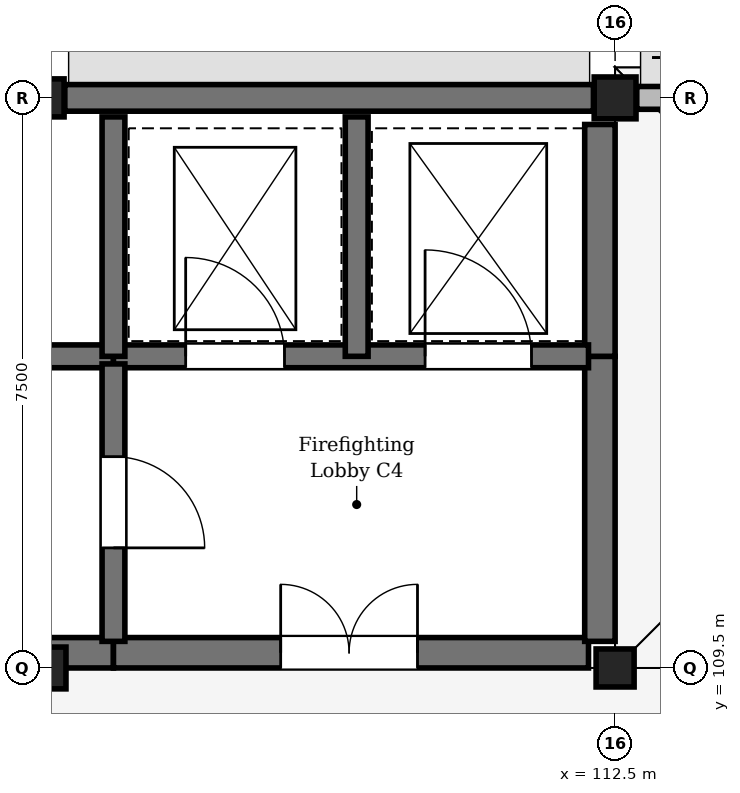
"""IFC4 building model, lengths in metres.
Left out: names, types, materials, properties, quantities, classifications, styles, units other than length and angle.
Written with IfcOpenShell. Run it as: python <this file> out.ifc"""

import sys

from ifc_helpers import new_model, si_unit, direction, frame, frame_2d, origin, origin_2d, place, context, subcontext, project, spatial, rectangle, extrude, element, fill, save


model = new_model("IFC4")
c1 = context("Model", 3, precision=1e-05, world=origin(), true_north=direction((0.0, 1.0)))
c2 = subcontext(c1, "Body", "Model", "MODEL_VIEW")
j1 = project(units=[si_unit("LENGTHUNIT", "METRE"), si_unit("PLANEANGLEUNIT", "RADIAN")], contexts=[c1])
p1 = place(None, origin())
s1 = spatial("IfcSite", under=j1, at=p1, CompositionType="ELEMENT")
p2 = place(p1, origin())
s2 = spatial("IfcBuilding", under=s1, at=p2, CompositionType="ELEMENT")
p3 = place(p2, frame((0.0, 0.0, 17.85)))
s3 = spatial("IfcBuildingStorey", under=s2, at=p3, CompositionType="ELEMENT", Elevation=17.85)
p4 = place(p3, frame((105.0, 109.5, 0.0), z_axis=(0.0, 0.0, 1.0), x_axis=(1.0, 0.0, 0.0)))
e1 = element("IfcColumn", 1, at=p4, inside=s3, PredefinedType="COLUMN", context=c2, shape_type="SweptSolid", body=[
    extrude(rectangle(XDim=0.55, YDim=0.55, at=origin_2d()), origin(), (0.0, 0.0, 1.0), 4.05),
])
for number, where, z_axis, x_axis in (
    (2, (105.0, 117.0, 0.0), (0.0, 0.0, 1.0), (1.0, 0.0, 0.0)),
    (3, (112.5, 109.5, 0.0), (0.0, 0.0, 1.0), (1.0, 0.0, 0.0)),
):
    element("IfcColumn", number, at=place(p3, frame(where, z_axis=z_axis, x_axis=x_axis)), inside=s3, PredefinedType="COLUMN", context=c2, shape_type="SweptSolid", body=[
        extrude(rectangle(XDim=0.5, YDim=0.5, at=origin_2d()), origin(), (0.0, 0.0, 1.0), 4.05),
    ])
p5 = place(p3, frame((112.5, 117.0, 0.0), z_axis=(0.0, 0.0, 1.0), x_axis=(1.0, 0.0, 0.0)))
e4 = element("IfcColumn", 4, at=p5, inside=s3, PredefinedType="COLUMN", context=c2, shape_type="SweptSolid", body=[
    extrude(rectangle(XDim=0.55, YDim=0.55, at=origin_2d()), origin(), (0.0, 0.0, 1.0), 4.05),
])
p6 = place(p3, frame((105.26, 117.0, 0.0), z_axis=(0.0, 0.0, 1.0), x_axis=(1.0, 0.0, 0.0)))
e5 = element("IfcWall", 5, at=p6, inside=s3, PredefinedType="SHEAR", context=c2, shape_type="SweptSolid", body=[
    extrude(rectangle(XDim=6.955, YDim=0.35, at=frame_2d((3.478, 0.0))), origin(), (0.0, 0.0, 1.0), 3.77),
])
p7 = place(p3, frame((112.785, 117.0, 0.0), z_axis=(0.0, 0.0, 1.0), x_axis=(1.0, 0.0, 0.0)))
e6 = element("IfcWall", 6, at=p7, inside=s3, PredefinedType="STANDARD", context=c2, shape_type="SweptSolid", body=[
    extrude(rectangle(XDim=6.98, YDim=0.3, at=frame_2d((3.49, 0.0))), origin(), (0.0, 0.0, 1.0), 3.77),
])
p8 = place(p7, frame((2.59, 0.0, 0.9)))
e7 = element("IfcOpeningElement", 7, at=p8, cuts=e6, PredefinedType="OPENING", context=c2, shape_type="SweptSolid", body=[
    extrude(rectangle(XDim=1.8, YDim=1.95, at=frame_2d((0.9, 0.975))), frame((0.0, 0.16, 0.0), z_axis=(0.0, -1.0, 0.0), x_axis=(1.0, 0.0, 0.0)), (0.0, 0.0, 1.0), 0.32),
])
p9 = place(p3, frame((97.85, 109.7, 0.0), z_axis=(0.0, 0.0, 1.0), x_axis=(1.0, 0.0, 0.0)))
e8 = element("IfcWall", 8, at=p9, inside=s3, PredefinedType="SHEAR", context=c2, shape_type="SweptSolid", body=[
    extrude(rectangle(XDim=8.05, YDim=0.4, at=frame_2d((4.025, 0.0))), origin(), (0.0, 0.0, 1.0), 3.77),
])
p10 = place(p3, frame((105.9, 109.7, 0.0), z_axis=(0.0, 0.0, 1.0), x_axis=(1.0, 0.0, 0.0)))
e9 = element("IfcWall", 9, at=p10, inside=s3, PredefinedType="SHEAR", context=c2, shape_type="SweptSolid", body=[
    extrude(rectangle(XDim=6.25, YDim=0.4, at=frame_2d((3.125, 0.0))), origin(), (0.0, 0.0, 1.0), 3.77),
])
p11 = place(p10, frame((2.2, 0.0, 0.0)))
e10 = element("IfcOpeningElement", 10, at=p11, cuts=e9, PredefinedType="OPENING", context=c2, shape_type="SweptSolid", body=[
    extrude(rectangle(XDim=1.8, YDim=2.25, at=frame_2d((0.9, 1.125))), frame((0.0, 0.21, 0.0), z_axis=(0.0, -1.0, 0.0), x_axis=(1.0, 0.0, 0.0)), (0.0, 0.0, 1.0), 0.42),
])
p12 = place(p3, frame((112.3, 109.85, 0.0), z_axis=(0.0, 0.0, 1.0), x_axis=(0.0, 1.0, 0.0)))
e11 = element("IfcWall", 11, at=p12, inside=s3, PredefinedType="SHEAR", context=c2, shape_type="SweptSolid", body=[
    extrude(rectangle(XDim=3.75, YDim=0.4, at=frame_2d((1.875, 0.0))), origin(), (0.0, 0.0, 1.0), 3.77),
])
p13 = place(p3, frame((112.3, 113.6, 0.0), z_axis=(0.0, 0.0, 1.0), x_axis=(0.0, 1.0, 0.0)))
e12 = element("IfcWall", 12, at=p13, inside=s3, PredefinedType="SHEAR", context=c2, shape_type="SweptSolid", body=[
    extrude(rectangle(XDim=3.05, YDim=0.4, at=frame_2d((1.525, 0.0))), origin(), (0.0, 0.0, 1.0), 3.77),
])
p14 = place(p3, frame((97.85, 113.6, 0.0), z_axis=(0.0, 0.0, 1.0), x_axis=(1.0, 0.0, 0.0)))
e13 = element("IfcWall", 13, at=p14, inside=s3, PredefinedType="SHEAR", context=c2, shape_type="SweptSolid", body=[
    extrude(rectangle(XDim=8.05, YDim=0.3, at=frame_2d((4.025, 0.0))), origin(), (0.0, 0.0, 1.0), 3.77),
])
p15 = place(p3, frame((105.9, 113.6, 0.0), z_axis=(0.0, 0.0, 1.0), x_axis=(1.0, 0.0, 0.0)))
e14 = element("IfcWall", 14, at=p15, inside=s3, PredefinedType="SHEAR", context=c2, shape_type="SweptSolid", body=[
    extrude(rectangle(XDim=6.25, YDim=0.3, at=frame_2d((3.125, 0.0))), origin(), (0.0, 0.0, 1.0), 3.77),
])
p16 = place(p15, frame((0.95, 0.0, 0.0)))
e15 = element("IfcOpeningElement", 15, at=p16, cuts=e14, PredefinedType="OPENING", context=c2, shape_type="SweptSolid", body=[
    extrude(rectangle(XDim=1.3, YDim=2.2, at=frame_2d((0.65, 1.1))), frame((0.0, 0.16, 0.0), z_axis=(0.0, -1.0, 0.0), x_axis=(1.0, 0.0, 0.0)), (0.0, 0.0, 1.0), 0.32),
])
p17 = place(p15, frame((4.1, 0.0, 0.0)))
e16 = element("IfcOpeningElement", 16, at=p17, cuts=e14, PredefinedType="OPENING", context=c2, shape_type="SweptSolid", body=[
    extrude(rectangle(XDim=1.4, YDim=2.25, at=frame_2d((0.7, 1.125))), frame((0.0, 0.16, 0.0), z_axis=(0.0, -1.0, 0.0), x_axis=(1.0, 0.0, 0.0)), (0.0, 0.0, 1.0), 0.32),
])
p18 = place(p3, frame((105.9, 113.5, 0.0), z_axis=(0.0, 0.0, 1.0), x_axis=(0.0, -1.0, 0.0)))
e17 = element("IfcWall", 17, at=p18, inside=s3, PredefinedType="SHEAR", context=c2, shape_type="SweptSolid", body=[
    extrude(rectangle(XDim=3.65, YDim=0.3, at=frame_2d((1.825, 0.0))), origin(), (0.0, 0.0, 1.0), 3.77),
])
p19 = place(p18, frame((1.22, 0.0, 0.0)))
e18 = element("IfcOpeningElement", 18, at=p19, cuts=e17, PredefinedType="OPENING", context=c2, shape_type="SweptSolid", body=[
    extrude(rectangle(XDim=1.2, YDim=2.25, at=frame_2d((0.6, 1.125))), frame((0.0, 0.16, 0.0), z_axis=(0.0, -1.0, 0.0), x_axis=(1.0, 0.0, 0.0)), (0.0, 0.0, 1.0), 0.32),
])
for number, where, z_axis, x_axis in (
    (19, (105.9, 113.6, 0.0), (0.0, 0.0, 1.0), (0.0, 1.0, 0.0)),
    (20, (109.1, 113.6, 0.0), (0.0, 0.0, 1.0), (0.0, 1.0, 0.0)),
):
    element("IfcWall", number, at=place(p3, frame(where, z_axis=z_axis, x_axis=x_axis)), inside=s3, PredefinedType="SHEAR", context=c2, shape_type="SweptSolid", body=[
        extrude(rectangle(XDim=3.15, YDim=0.3, at=frame_2d((1.575, 0.0))), origin(), (0.0, 0.0, 1.0), 3.77),
    ])
p20 = place(p11, origin())
e21 = element("IfcDoor", 21, at=p20, inside=s3, OperationType="DOUBLE_DOOR_SINGLE_SWING", PredefinedType="DOOR", context=c2, shape_type="SweptSolid", body=[
    extrude(rectangle(XDim=1.8, YDim=2.25, at=frame_2d((0.9, 1.125))), frame((0.0, 0.025, 0.0), z_axis=(0.0, -1.0, 0.0), x_axis=(1.0, 0.0, 0.0)), (0.0, 0.0, 1.0), 0.05),
])
fill(e10, e21)
p21 = place(p16, origin())
e22 = element("IfcDoor", 22, at=p21, inside=s3, OperationType="DOUBLE_DOOR_SLIDING", PredefinedType="DOOR", context=c2, shape_type="SweptSolid", body=[
    extrude(rectangle(XDim=1.3, YDim=2.2, at=frame_2d((0.65, 1.1))), frame((0.0, 0.025, 0.0), z_axis=(0.0, -1.0, 0.0), x_axis=(1.0, 0.0, 0.0)), (0.0, 0.0, 1.0), 0.05),
])
fill(e15, e22)
p22 = place(p17, origin())
e23 = element("IfcDoor", 23, at=p22, inside=s3, OperationType="DOUBLE_DOOR_SLIDING", PredefinedType="DOOR", context=c2, shape_type="SweptSolid", body=[
    extrude(rectangle(XDim=1.4, YDim=2.25, at=frame_2d((0.7, 1.125))), frame((0.0, 0.025, 0.0), z_axis=(0.0, -1.0, 0.0), x_axis=(1.0, 0.0, 0.0)), (0.0, 0.0, 1.0), 0.05),
])
fill(e16, e23)
p23 = place(p19, origin())
e24 = element("IfcDoor", 24, at=p23, inside=s3, OperationType="SINGLE_SWING_RIGHT", PredefinedType="DOOR", context=c2, shape_type="SweptSolid", body=[
    extrude(rectangle(XDim=1.2, YDim=2.25, at=frame_2d((0.6, 1.125))), frame((0.0, 0.025, 0.0), z_axis=(0.0, -1.0, 0.0), x_axis=(1.0, 0.0, 0.0)), (0.0, 0.0, 1.0), 0.05),
])
fill(e18, e24)
save(model, sys.argv[1])
